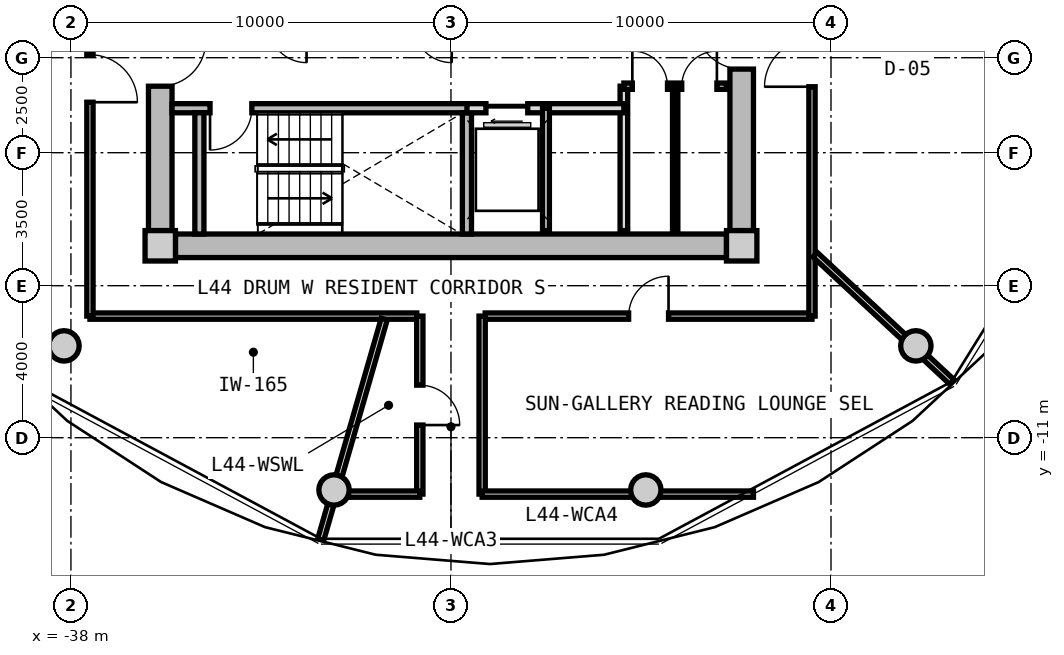
"""IFC4 building model, lengths in metres.
Left out: names, types, materials, properties, quantities, classifications, styles, units other than length and angle.
Written with IfcOpenShell. Run it as: python <this file> out.ifc"""

import sys

from ifc_helpers import new_model, si_unit, direction, frame, frame_2d, origin, origin_2d, place, context, subcontext, project, spatial, rectangle, circle, extrude, source, transform, mapped, element, fill, save


model = new_model("IFC4")
c1 = context("Model", 3, precision=1e-05, world=origin(), true_north=direction((0.0, 1.0)))
c2 = subcontext(c1, "Body", "Model", "MODEL_VIEW")
j1 = project(units=[si_unit("LENGTHUNIT", "METRE"), si_unit("PLANEANGLEUNIT", "RADIAN")], contexts=[c1])
p1 = place(None, origin())
s1 = spatial("IfcSite", under=j1, at=p1, CompositionType="ELEMENT")
p2 = place(p1, origin())
s2 = spatial("IfcBuilding", under=s1, at=p2, CompositionType="ELEMENT")
p3 = place(p2, frame((0.0, 0.0, 143.45)))
s3 = spatial("IfcBuildingStorey", under=s2, at=p3, CompositionType="ELEMENT", Elevation=143.45)
m1 = source(origin(), c2, "Body", "SweptSolid", [
    extrude(rectangle(XDim=0.8, YDim=0.8, at=origin_2d()), origin(), (0.0, 0.0, 1.0), 3.05),
])
for number, where, z_axis, x_axis in (
    (1, (-35.65, -5.95, 0.0), (0.0, 0.0, 1.0), (1.0, 0.0, 0.0)),
    (2, (-20.35, -5.95, 0.0), (0.0, 0.0, 1.0), (1.0, 0.0, 0.0)),
):
    element("IfcColumn", number, at=place(p3, frame(where, z_axis=z_axis, x_axis=x_axis)), inside=s3, PredefinedType="COLUMN", context=c2, shape_type="MappedRepresentation", body=[
        mapped(m1, transform((0.0, 0.0, 0.0), x_axis=(1.0, 0.0, 0.0), y_axis=(0.0, 1.0, 0.0), z_axis=(0.0, 0.0, 1.0), scale=1.0)),
    ])
m2 = source(origin(), c2, "Body", "SweptSolid", [
    extrude(rectangle(XDim=14.5, YDim=0.62, at=frame_2d((7.25, 0.0))), origin(), (0.0, 0.0, 1.0), 2.81),
])
p4 = place(p3, frame((-20.75, -5.95, 0.0), z_axis=(0.0, 0.0, 1.0), x_axis=(-1.0, 0.0, 0.0)))
e3 = element("IfcWall", 3, at=p4, inside=s3, PredefinedType="SHEAR", context=c2, shape_type="MappedRepresentation", body=[
    mapped(m2, transform((0.0, 0.0, 0.0), x_axis=(1.0, 0.0, 0.0), y_axis=(0.0, 1.0, 0.0), z_axis=(0.0, 0.0, 1.0), scale=1.0)),
])
m3 = source(origin(), c2, "Body", "SweptSolid", [
    extrude(rectangle(XDim=11.1, YDim=0.62, at=frame_2d((5.55, 0.0))), origin(), (0.0, 0.0, 1.0), 2.81),
])
p5 = place(p3, frame((-35.65, -5.55, 0.0), z_axis=(0.0, 0.0, 1.0), x_axis=(0.0, 1.0, 0.0)))
e4 = element("IfcWall", 4, at=p5, inside=s3, PredefinedType="SHEAR", context=c2, shape_type="MappedRepresentation", body=[
    mapped(m3, transform((0.0, 0.0, 0.0), x_axis=(1.0, 0.0, 0.0), y_axis=(0.0, 1.0, 0.0), z_axis=(0.0, 0.0, 1.0), scale=1.0)),
])
p6 = place(p5, frame((3.8, 0.0, 0.0)))
e5 = element("IfcOpeningElement", 5, at=p6, cuts=e4, PredefinedType="OPENING", context=c2, shape_type="SweptSolid", body=[
    extrude(rectangle(XDim=1.2, YDim=2.15, at=frame_2d((0.6, 1.075))), frame((0.0, 0.32, 0.0), z_axis=(0.0, -1.0, 0.0), x_axis=(1.0, 0.0, 0.0)), (0.0, 0.0, 1.0), 0.64),
])
p7 = place(p3, frame((-20.35, 5.55, 0.0), z_axis=(0.0, 0.0, 1.0), x_axis=(0.0, -1.0, 0.0)))
e6 = element("IfcWall", 6, at=p7, inside=s3, PredefinedType="SHEAR", context=c2, shape_type="MappedRepresentation", body=[
    mapped(m3, transform((0.0, 0.0, 0.0), x_axis=(1.0, 0.0, 0.0), y_axis=(0.0, 1.0, 0.0), z_axis=(0.0, 0.0, 1.0), scale=1.0)),
])
p8 = place(p7, frame((5.65, 0.0, 0.0)))
e7 = element("IfcOpeningElement", 7, at=p8, cuts=e6, PredefinedType="OPENING", context=c2, shape_type="SweptSolid", body=[
    extrude(rectangle(XDim=1.2, YDim=2.15, at=frame_2d((0.6, 1.075))), frame((0.0, 0.32, 0.0), z_axis=(0.0, -1.0, 0.0), x_axis=(1.0, 0.0, 0.0)), (0.0, 0.0, 1.0), 0.64),
])
m4 = source(origin(), c2, "Body", "SweptSolid", [
    extrude(circle(Radius=0.4, at=origin_2d()), origin(), (0.0, 0.0, 1.0), 3.05),
])
for number, where, z_axis, x_axis in (
    (8, (-38.183, -8.584, 0.0), (0.0, 0.0, 1.0), (1.0, 0.0, 0.0)),
    (9, (-31.077, -12.375, 0.0), (0.0, 0.0, 1.0), (1.0, 0.0, 0.0)),
    (10, (-22.873, -12.375, 0.0), (0.0, 0.0, 1.0), (1.0, 0.0, 0.0)),
    (11, (-15.767, -8.584, 0.0), (0.0, 0.0, 1.0), (1.0, 0.0, 0.0)),
):
    element("IfcColumn", number, at=place(p3, frame(where, z_axis=z_axis, x_axis=x_axis)), inside=s3, PredefinedType="COLUMN", context=c2, shape_type="MappedRepresentation", body=[
        mapped(m4, transform((0.0, 0.0, 0.0), x_axis=(1.0, 0.0, 0.0), y_axis=(0.0, 1.0, 0.0), z_axis=(0.0, 0.0, 1.0), scale=1.0)),
    ])
m5 = source(origin(), c2, "Body", "SweptSolid", [
    extrude(rectangle(XDim=7.88, YDim=0.24, at=frame_2d((3.94, 0.0))), origin(), (0.0, 0.0, 1.0), 2.81),
])
p9 = place(p3, frame((-35.34, -2.33, 0.0), z_axis=(0.0, 0.0, 1.0), x_axis=(1.0, 0.0, 0.0)))
e12 = element("IfcWall", 12, at=p9, inside=s3, PredefinedType="PARTITIONING", context=c2, shape_type="MappedRepresentation", body=[
    mapped(m5, transform((0.0, 0.0, 0.0), x_axis=(1.0, 0.0, 0.0), y_axis=(0.0, 1.0, 0.0), z_axis=(0.0, 0.0, 1.0), scale=1.0)),
])
p10 = place(p9, frame((1.0, 0.0, 0.0)))
e13 = element("IfcOpeningElement", 13, at=p10, cuts=e12, PredefinedType="OPENING", context=c2, shape_type="SweptSolid", body=[
    extrude(rectangle(XDim=1.1, YDim=2.15, at=frame_2d((0.55, 1.075))), frame((0.0, 0.13, 0.0), z_axis=(0.0, -1.0, 0.0), x_axis=(1.0, 0.0, 0.0)), (0.0, 0.0, 1.0), 0.26),
])
m6 = source(origin(), c2, "Body", "SweptSolid", [
    extrude(rectangle(XDim=3.19, YDim=0.24, at=frame_2d((1.595, 0.0))), origin(), (0.0, 0.0, 1.0), 2.81),
])
for number, where, z_axis, x_axis in (
    (14, (-34.62, -5.64, 0.0), (0.0, 0.0, 1.0), (0.0, 1.0, 0.0)),
    (15, (-27.58, -5.64, 0.0), (0.0, 0.0, 1.0), (0.0, 1.0, 0.0)),
):
    element("IfcWall", number, at=place(p3, frame(where, z_axis=z_axis, x_axis=x_axis)), inside=s3, PredefinedType="PARTITIONING", context=c2, shape_type="MappedRepresentation", body=[
        mapped(m6, transform((0.0, 0.0, 0.0), x_axis=(1.0, 0.0, 0.0), y_axis=(0.0, 1.0, 0.0), z_axis=(0.0, 0.0, 1.0), scale=1.0)),
    ])
m7 = source(origin(), c2, "Body", "SweptSolid", [
    extrude(rectangle(XDim=3.8, YDim=0.2, at=frame_2d((1.9, 0.0))), origin(), (0.0, 0.0, 1.0), 2.795),
])
p11 = place(p3, frame((-23.45, -5.55, 0.0), z_axis=(0.0, 0.0, 1.0), x_axis=(0.0, 1.0, 0.0)))
e16 = element("IfcWall", 16, at=p11, inside=s3, PredefinedType="PARTITIONING", context=c2, shape_type="MappedRepresentation", body=[
    mapped(m7, transform((0.0, 0.0, 0.0), x_axis=(1.0, 0.0, 0.0), y_axis=(0.0, 1.0, 0.0), z_axis=(0.0, 0.0, 1.0), scale=1.0)),
])
m8 = source(origin(), c2, "Body", "SweptSolid", [
    extrude(rectangle(XDim=4.13, YDim=0.24, at=frame_2d((2.065, 0.0))), origin(), (0.0, 0.0, 1.0), 2.795),
])
p12 = place(p3, frame((-27.58, -2.33, 0.0), z_axis=(0.0, 0.0, 1.0), x_axis=(1.0, 0.0, 0.0)))
e17 = element("IfcWall", 17, at=p12, inside=s3, PredefinedType="PARTITIONING", context=c2, shape_type="MappedRepresentation", body=[
    mapped(m8, transform((0.0, 0.0, 0.0), x_axis=(1.0, 0.0, 0.0), y_axis=(0.0, 1.0, 0.0), z_axis=(0.0, 0.0, 1.0), scale=1.0)),
])
p13 = place(p12, frame((0.5, 0.0, 0.0)))
e18 = element("IfcOpeningElement", 18, at=p13, cuts=e17, PredefinedType="OPENING", context=c2, shape_type="SweptSolid", body=[
    extrude(rectangle(XDim=1.1, YDim=2.2, at=frame_2d((0.55, 1.1))), frame((0.0, 0.13, 0.0), z_axis=(0.0, -1.0, 0.0), x_axis=(1.0, 0.0, 0.0)), (0.0, 0.0, 1.0), 0.26),
])
m9 = source(origin(), c2, "Body", "SweptSolid", [
    extrude(rectangle(XDim=3.22, YDim=0.18, at=frame_2d((1.61, 0.0))), origin(), (0.0, 0.0, 1.0), 2.795),
])
p14 = place(p3, frame((-25.5, -5.55, 0.0), z_axis=(0.0, 0.0, 1.0), x_axis=(0.0, 1.0, 0.0)))
e19 = element("IfcWall", 19, at=p14, inside=s3, PredefinedType="PARTITIONING", context=c2, shape_type="MappedRepresentation", body=[
    mapped(m9, transform((0.0, 0.0, 0.0), x_axis=(1.0, 0.0, 0.0), y_axis=(0.0, 1.0, 0.0), z_axis=(0.0, 0.0, 1.0), scale=1.0)),
])
m10 = source(origin(), c2, "Body", "SweptSolid", [
    extrude(rectangle(XDim=2.7, YDim=0.165, at=frame_2d((1.35, 0.0))), origin(), (0.0, 0.0, 1.0), 2.795),
])
p15 = place(p3, frame((-23.45, -1.75, 0.0), z_axis=(0.0, 0.0, 1.0), x_axis=(1.0, 0.0, 0.0)))
e20 = element("IfcWall", 20, at=p15, inside=s3, PredefinedType="PARTITIONING", context=c2, shape_type="MappedRepresentation", body=[
    mapped(m10, transform((0.0, 0.0, 0.0), x_axis=(1.0, 0.0, 0.0), y_axis=(0.0, 1.0, 0.0), z_axis=(0.0, 0.0, 1.0), scale=1.0)),
])
p16 = place(p15, frame((0.222, 0.0, 0.0)))
e21 = element("IfcOpeningElement", 21, at=p16, cuts=e20, PredefinedType="OPENING", context=c2, shape_type="SweptSolid", body=[
    extrude(rectangle(XDim=0.925, YDim=2.1, at=frame_2d((0.462, 1.05))), frame((0.0, 0.093, 0.0), z_axis=(0.0, -1.0, 0.0), x_axis=(1.0, 0.0, 0.0)), (0.0, 0.0, 1.0), 0.185),
])
p17 = place(p15, frame((1.522, 0.0, 0.0)))
e22 = element("IfcOpeningElement", 22, at=p17, cuts=e20, PredefinedType="OPENING", context=c2, shape_type="SweptSolid", body=[
    extrude(rectangle(XDim=0.925, YDim=2.1, at=frame_2d((0.462, 1.05))), frame((0.0, 0.093, 0.0), z_axis=(0.0, -1.0, 0.0), x_axis=(1.0, 0.0, 0.0)), (0.0, 0.0, 1.0), 0.185),
])
m11 = source(origin(), c2, "Body", "SweptSolid", [
    extrude(rectangle(XDim=3.8, YDim=0.14, at=frame_2d((1.9, 0.0))), origin(), (0.0, 0.0, 1.0), 2.795),
])
p18 = place(p3, frame((-22.1, -5.55, 0.0), z_axis=(0.0, 0.0, 1.0), x_axis=(0.0, 1.0, 0.0)))
e23 = element("IfcWall", 23, at=p18, inside=s3, PredefinedType="PARTITIONING", context=c2, shape_type="MappedRepresentation", body=[
    mapped(m11, transform((0.0, 0.0, 0.0), x_axis=(1.0, 0.0, 0.0), y_axis=(0.0, 1.0, 0.0), z_axis=(0.0, 0.0, 1.0), scale=1.0)),
])
m12 = source(origin(), c2, "Body", "SweptSolid", [
    extrude(rectangle(XDim=8.6, YDim=0.165, at=frame_2d((4.3, 0.0))), origin(), (0.0, 0.0, 1.0), 2.795),
])
p19 = place(p3, frame((-18.5, -7.8, 0.0), z_axis=(0.0, 0.0, 1.0), x_axis=(-1.0, 0.0, 0.0)))
e24 = element("IfcWall", 24, at=p19, inside=s3, PredefinedType="PARTITIONING", context=c2, shape_type="MappedRepresentation", body=[
    mapped(m12, transform((0.0, 0.0, 0.0), x_axis=(1.0, 0.0, 0.0), y_axis=(0.0, 1.0, 0.0), z_axis=(0.0, 0.0, 1.0), scale=1.0)),
])
p20 = place(p19, frame((3.775, 0.0, 0.0)))
e25 = element("IfcOpeningElement", 25, at=p20, cuts=e24, PredefinedType="OPENING", context=c2, shape_type="SweptSolid", body=[
    extrude(rectangle(XDim=1.05, YDim=2.15, at=frame_2d((0.525, 1.075))), frame((0.0, 0.093, 0.0), z_axis=(0.0, -1.0, 0.0), x_axis=(1.0, 0.0, 0.0)), (0.0, 0.0, 1.0), 0.185),
])
p21 = place(p3, frame((-28.9, -7.8, 0.0), z_axis=(0.0, 0.0, 1.0), x_axis=(-1.0, 0.0, 0.0)))
e26 = element("IfcWall", 26, at=p21, inside=s3, PredefinedType="PARTITIONING", context=c2, shape_type="MappedRepresentation", body=[
    mapped(m12, transform((0.0, 0.0, 0.0), x_axis=(1.0, 0.0, 0.0), y_axis=(0.0, 1.0, 0.0), z_axis=(0.0, 0.0, 1.0), scale=1.0)),
])
m13 = source(origin(), c2, "Body", "SweptSolid", [
    extrude(rectangle(XDim=15.6, YDim=0.165, at=frame_2d((7.8, 0.0))), origin(), (0.0, 0.0, 1.0), 2.795),
])
p22 = place(p3, frame((-37.5, -7.8, 0.0), z_axis=(0.0, 0.0, 1.0), x_axis=(0.0, 1.0, 0.0)))
e27 = element("IfcWall", 27, at=p22, inside=s3, PredefinedType="PARTITIONING", context=c2, shape_type="MappedRepresentation", body=[
    mapped(m13, transform((0.0, 0.0, 0.0), x_axis=(1.0, 0.0, 0.0), y_axis=(0.0, 1.0, 0.0), z_axis=(0.0, 0.0, 1.0), scale=1.0)),
])
p23 = place(p22, frame((13.325, 0.0, 0.0)))
e28 = element("IfcOpeningElement", 28, at=p23, cuts=e27, PredefinedType="OPENING", context=c2, shape_type="SweptSolid", body=[
    extrude(rectangle(XDim=0.92, YDim=2.1, at=frame_2d((0.46, 1.05))), frame((0.0, 0.093, 0.0), z_axis=(0.0, -1.0, 0.0), x_axis=(1.0, 0.0, 0.0)), (0.0, 0.0, 1.0), 0.185),
])
p24 = place(p22, frame((5.628, 0.0, 0.0)))
e29 = element("IfcOpeningElement", 29, at=p24, cuts=e27, PredefinedType="OPENING", context=c2, shape_type="SweptSolid", body=[
    extrude(rectangle(XDim=1.25, YDim=2.2, at=frame_2d((0.625, 1.1))), frame((0.0, 0.093, 0.0), z_axis=(0.0, -1.0, 0.0), x_axis=(1.0, 0.0, 0.0)), (0.0, 0.0, 1.0), 0.185),
])
p25 = place(p3, frame((-18.5, 7.8, 0.0), z_axis=(0.0, 0.0, 1.0), x_axis=(0.0, -1.0, 0.0)))
e30 = element("IfcWall", 30, at=p25, inside=s3, PredefinedType="PARTITIONING", context=c2, shape_type="MappedRepresentation", body=[
    mapped(m13, transform((0.0, 0.0, 0.0), x_axis=(1.0, 0.0, 0.0), y_axis=(0.0, 1.0, 0.0), z_axis=(0.0, 0.0, 1.0), scale=1.0)),
])
p26 = place(p25, frame((8.314, 0.0, 0.0)))
e31 = element("IfcOpeningElement", 31, at=p26, cuts=e30, PredefinedType="OPENING", context=c2, shape_type="SweptSolid", body=[
    extrude(rectangle(XDim=1.25, YDim=2.2, at=frame_2d((0.625, 1.1))), frame((0.0, 0.093, 0.0), z_axis=(0.0, -1.0, 0.0), x_axis=(1.0, 0.0, 0.0)), (0.0, 0.0, 1.0), 0.185),
])
p27 = place(p25, frame((1.515, 0.0, 0.0)))
e32 = element("IfcOpeningElement", 32, at=p27, cuts=e30, PredefinedType="OPENING", context=c2, shape_type="SweptSolid", body=[
    extrude(rectangle(XDim=1.05, YDim=2.15, at=frame_2d((0.525, 1.075))), frame((0.0, 0.093, 0.0), z_axis=(0.0, -1.0, 0.0), x_axis=(1.0, 0.0, 0.0)), (0.0, 0.0, 1.0), 0.185),
])
m14 = source(origin(), c2, "Body", "SweptSolid", [
    extrude(rectangle(XDim=6.035, YDim=0.165, at=frame_2d((3.018, 0.0))), origin(), (0.0, 0.0, 1.0), 2.345),
])
p28 = place(p3, frame((-29.756, -7.88, 0.0), z_axis=(0.0, 0.0, 1.0), x_axis=(-0.276809454862, -0.960924828329, 0.0)))
e33 = element("IfcWall", 33, at=p28, inside=s3, PredefinedType="PARTITIONING", context=c2, shape_type="MappedRepresentation", body=[
    mapped(m14, transform((0.0, 0.0, 0.0), x_axis=(1.0, 0.0, 0.0), y_axis=(0.0, 1.0, 0.0), z_axis=(0.0, 0.0, 1.0), scale=1.0)),
])
m15 = source(origin(), c2, "Body", "SweptSolid", [
    extrude(rectangle(XDim=4.927, YDim=0.165, at=frame_2d((2.463, 0.0))), origin(), (0.0, 0.0, 1.0), 2.345),
])
p29 = place(p3, frame((-18.42, -6.183, 0.0), z_axis=(0.0, 0.0, 1.0), x_axis=(0.732191335987, -0.681098999783, 0.0)))
e34 = element("IfcWall", 34, at=p29, inside=s3, PredefinedType="PARTITIONING", context=c2, shape_type="MappedRepresentation", body=[
    mapped(m15, transform((0.0, 0.0, 0.0), x_axis=(1.0, 0.0, 0.0), y_axis=(0.0, 1.0, 0.0), z_axis=(0.0, 0.0, 1.0), scale=1.0)),
])
m16 = source(origin(), c2, "Body", "SweptSolid", [
    extrude(rectangle(XDim=4.685, YDim=0.165, at=frame_2d((2.342, 0.0))), origin(), (0.0, 0.0, 1.0), 2.795),
])
p30 = place(p3, frame((-28.82, -12.485, 0.0), z_axis=(0.0, 0.0, 1.0), x_axis=(0.0, 1.0, 0.0)))
e35 = element("IfcWall", 35, at=p30, inside=s3, PredefinedType="PARTITIONING", context=c2, shape_type="MappedRepresentation", body=[
    mapped(m16, transform((0.0, 0.0, 0.0), x_axis=(1.0, 0.0, 0.0), y_axis=(0.0, 1.0, 0.0), z_axis=(0.0, 0.0, 1.0), scale=1.0)),
])
p31 = place(p30, frame((1.817, 0.0, 0.0)))
e36 = element("IfcOpeningElement", 36, at=p31, cuts=e35, PredefinedType="OPENING", context=c2, shape_type="SweptSolid", body=[
    extrude(rectangle(XDim=1.05, YDim=2.15, at=frame_2d((0.525, 1.075))), frame((0.0, 0.093, 0.0), z_axis=(0.0, -1.0, 0.0), x_axis=(1.0, 0.0, 0.0)), (0.0, 0.0, 1.0), 0.185),
])
m17 = source(origin(), c2, "Body", "SweptSolid", [
    extrude(rectangle(XDim=2.419, YDim=0.165, at=frame_2d((1.209, 0.0))), origin(), (0.0, 0.0, 1.0), 2.345),
])
p32 = place(p3, frame((-31.239, -12.485, 0.0), z_axis=(0.0, 0.0, 1.0), x_axis=(1.0, 0.0, 0.0)))
e37 = element("IfcWall", 37, at=p32, inside=s3, PredefinedType="PARTITIONING", context=c2, shape_type="MappedRepresentation", body=[
    mapped(m17, transform((0.0, 0.0, 0.0), x_axis=(1.0, 0.0, 0.0), y_axis=(0.0, 1.0, 0.0), z_axis=(0.0, 0.0, 1.0), scale=1.0)),
])
p33 = place(p3, frame((-27.18, -12.485, 0.0), z_axis=(0.0, 0.0, 1.0), x_axis=(0.0, 1.0, 0.0)))
e38 = element("IfcWall", 38, at=p33, inside=s3, PredefinedType="PARTITIONING", context=c2, shape_type="MappedRepresentation", body=[
    mapped(m16, transform((0.0, 0.0, 0.0), x_axis=(1.0, 0.0, 0.0), y_axis=(0.0, 1.0, 0.0), z_axis=(0.0, 0.0, 1.0), scale=1.0)),
])
m18 = source(origin(), c2, "Body", "SweptSolid", [
    extrude(rectangle(XDim=7.139, YDim=0.165, at=frame_2d((3.569, 0.0))), origin(), (0.0, 0.0, 1.0), 2.345),
])
p34 = place(p3, frame((-27.18, -12.485, 0.0), z_axis=(0.0, 0.0, 1.0), x_axis=(1.0, 0.0, 0.0)))
e39 = element("IfcWall", 39, at=p34, inside=s3, PredefinedType="PARTITIONING", context=c2, shape_type="MappedRepresentation", body=[
    mapped(m18, transform((0.0, 0.0, 0.0), x_axis=(1.0, 0.0, 0.0), y_axis=(0.0, 1.0, 0.0), z_axis=(0.0, 0.0, 1.0), scale=1.0)),
])
m19 = source(origin(), c2, "Body", "SweptSolid", [
    extrude(rectangle(XDim=1.1, YDim=2.15, at=frame_2d((0.55, 1.075))), frame((0.0, 0.025, 0.0), z_axis=(0.0, -1.0, 0.0), x_axis=(1.0, 0.0, 0.0)), (0.0, 0.0, 1.0), 0.05),
])
p35 = place(p10, frame((1.1, 0.0, 0.0), z_axis=(0.0, 0.0, 1.0), x_axis=(-1.0, 0.0, 0.0)))
e40 = element("IfcDoor", 40, at=p35, inside=s3, OperationType="SINGLE_SWING_RIGHT", PredefinedType="DOOR", context=c2, shape_type="MappedRepresentation", body=[
    mapped(m19, transform((0.0, 0.0, 0.0), x_axis=(1.0, 0.0, 0.0), y_axis=(0.0, 1.0, 0.0), z_axis=(0.0, 0.0, 1.0), scale=1.0)),
])
fill(e13, e40)
m20 = source(origin(), c2, "Body", "SweptSolid", [
    extrude(rectangle(XDim=1.2, YDim=2.15, at=frame_2d((0.6, 1.075))), frame((0.0, 0.025, 0.0), z_axis=(0.0, -1.0, 0.0), x_axis=(1.0, 0.0, 0.0)), (0.0, 0.0, 1.0), 0.05),
])
p36 = place(p6, frame((1.2, 0.0, 0.0), z_axis=(0.0, 0.0, 1.0), x_axis=(-1.0, 0.0, 0.0)))
e41 = element("IfcDoor", 41, at=p36, inside=s3, OperationType="SINGLE_SWING_LEFT", PredefinedType="DOOR", context=c2, shape_type="MappedRepresentation", body=[
    mapped(m20, transform((0.0, 0.0, 0.0), x_axis=(1.0, 0.0, 0.0), y_axis=(0.0, 1.0, 0.0), z_axis=(0.0, 0.0, 1.0), scale=1.0)),
])
fill(e5, e41)
p37 = place(p8, frame((1.2, 0.0, 0.0), z_axis=(0.0, 0.0, 1.0), x_axis=(-1.0, 0.0, 0.0)))
e42 = element("IfcDoor", 42, at=p37, inside=s3, OperationType="SINGLE_SWING_RIGHT", PredefinedType="DOOR", context=c2, shape_type="MappedRepresentation", body=[
    mapped(m20, transform((0.0, 0.0, 0.0), x_axis=(1.0, 0.0, 0.0), y_axis=(0.0, 1.0, 0.0), z_axis=(0.0, 0.0, 1.0), scale=1.0)),
])
fill(e7, e42)
m21 = source(origin(), c2, "Body", "SweptSolid", [
    extrude(rectangle(XDim=1.1, YDim=2.2, at=frame_2d((0.55, 1.1))), frame((0.0, 0.025, 0.0), z_axis=(0.0, -1.0, 0.0), x_axis=(1.0, 0.0, 0.0)), (0.0, 0.0, 1.0), 0.05),
])
p38 = place(p13, frame((1.1, 0.0, 0.0), z_axis=(0.0, 0.0, 1.0), x_axis=(-1.0, 0.0, 0.0)))
e43 = element("IfcDoor", 43, at=p38, inside=s3, OperationType="SLIDING_TO_LEFT", PredefinedType="DOOR", context=c2, shape_type="MappedRepresentation", body=[
    mapped(m21, transform((0.0, 0.0, 0.0), x_axis=(1.0, 0.0, 0.0), y_axis=(0.0, 1.0, 0.0), z_axis=(0.0, 0.0, 1.0), scale=1.0)),
])
fill(e18, e43)
m22 = source(origin(), c2, "Body", "SweptSolid", [
    extrude(rectangle(XDim=0.925, YDim=2.1, at=frame_2d((0.462, 1.05))), frame((0.0, 0.025, 0.0), z_axis=(0.0, -1.0, 0.0), x_axis=(1.0, 0.0, 0.0)), (0.0, 0.0, 1.0), 0.05),
])
p39 = place(p16, origin())
e44 = element("IfcDoor", 44, at=p39, inside=s3, OperationType="SINGLE_SWING_LEFT", PredefinedType="DOOR", context=c2, shape_type="MappedRepresentation", body=[
    mapped(m22, transform((0.0, 0.0, 0.0), x_axis=(1.0, 0.0, 0.0), y_axis=(0.0, 1.0, 0.0), z_axis=(0.0, 0.0, 1.0), scale=1.0)),
])
fill(e21, e44)
p40 = place(p17, origin())
e45 = element("IfcDoor", 45, at=p40, inside=s3, OperationType="SINGLE_SWING_RIGHT", PredefinedType="DOOR", context=c2, shape_type="MappedRepresentation", body=[
    mapped(m22, transform((0.0, 0.0, 0.0), x_axis=(1.0, 0.0, 0.0), y_axis=(0.0, 1.0, 0.0), z_axis=(0.0, 0.0, 1.0), scale=1.0)),
])
fill(e22, e45)
m23 = source(origin(), c2, "Body", "SweptSolid", [
    extrude(rectangle(XDim=1.05, YDim=2.15, at=frame_2d((0.525, 1.075))), frame((0.0, 0.025, 0.0), z_axis=(0.0, -1.0, 0.0), x_axis=(1.0, 0.0, 0.0)), (0.0, 0.0, 1.0), 0.05),
])
p41 = place(p31, frame((1.05, 0.0, 0.0), z_axis=(0.0, 0.0, 1.0), x_axis=(-1.0, 0.0, 0.0)))
e46 = element("IfcDoor", 46, at=p41, inside=s3, OperationType="SINGLE_SWING_RIGHT", PredefinedType="DOOR", context=c2, shape_type="MappedRepresentation", body=[
    mapped(m23, transform((0.0, 0.0, 0.0), x_axis=(1.0, 0.0, 0.0), y_axis=(0.0, 1.0, 0.0), z_axis=(0.0, 0.0, 1.0), scale=1.0)),
])
fill(e36, e46)
p42 = place(p20, frame((1.05, 0.0, 0.0), z_axis=(0.0, 0.0, 1.0), x_axis=(-1.0, 0.0, 0.0)))
e47 = element("IfcDoor", 47, at=p42, inside=s3, OperationType="SINGLE_SWING_RIGHT", PredefinedType="DOOR", context=c2, shape_type="MappedRepresentation", body=[
    mapped(m23, transform((0.0, 0.0, 0.0), x_axis=(1.0, 0.0, 0.0), y_axis=(0.0, 1.0, 0.0), z_axis=(0.0, 0.0, 1.0), scale=1.0)),
])
fill(e25, e47)
m24 = source(origin(), c2, "Body", "SweptSolid", [
    extrude(rectangle(XDim=1.25, YDim=2.2, at=frame_2d((0.625, 1.1))), frame((0.0, 0.025, 0.0), z_axis=(0.0, -1.0, 0.0), x_axis=(1.0, 0.0, 0.0)), (0.0, 0.0, 1.0), 0.05),
])
p43 = place(p24, frame((1.25, 0.0, 0.0), z_axis=(0.0, 0.0, 1.0), x_axis=(-1.0, 0.0, 0.0)))
e48 = element("IfcDoor", 48, at=p43, inside=s3, OperationType="SINGLE_SWING_RIGHT", PredefinedType="DOOR", context=c2, shape_type="MappedRepresentation", body=[
    mapped(m24, transform((0.0, 0.0, 0.0), x_axis=(1.0, 0.0, 0.0), y_axis=(0.0, 1.0, 0.0), z_axis=(0.0, 0.0, 1.0), scale=1.0)),
])
fill(e29, e48)
p44 = place(p26, frame((1.25, 0.0, 0.0), z_axis=(0.0, 0.0, 1.0), x_axis=(-1.0, 0.0, 0.0)))
e49 = element("IfcDoor", 49, at=p44, inside=s3, OperationType="SINGLE_SWING_LEFT", PredefinedType="DOOR", context=c2, shape_type="MappedRepresentation", body=[
    mapped(m24, transform((0.0, 0.0, 0.0), x_axis=(1.0, 0.0, 0.0), y_axis=(0.0, 1.0, 0.0), z_axis=(0.0, 0.0, 1.0), scale=1.0)),
])
fill(e31, e49)
save(model, sys.argv[1])
